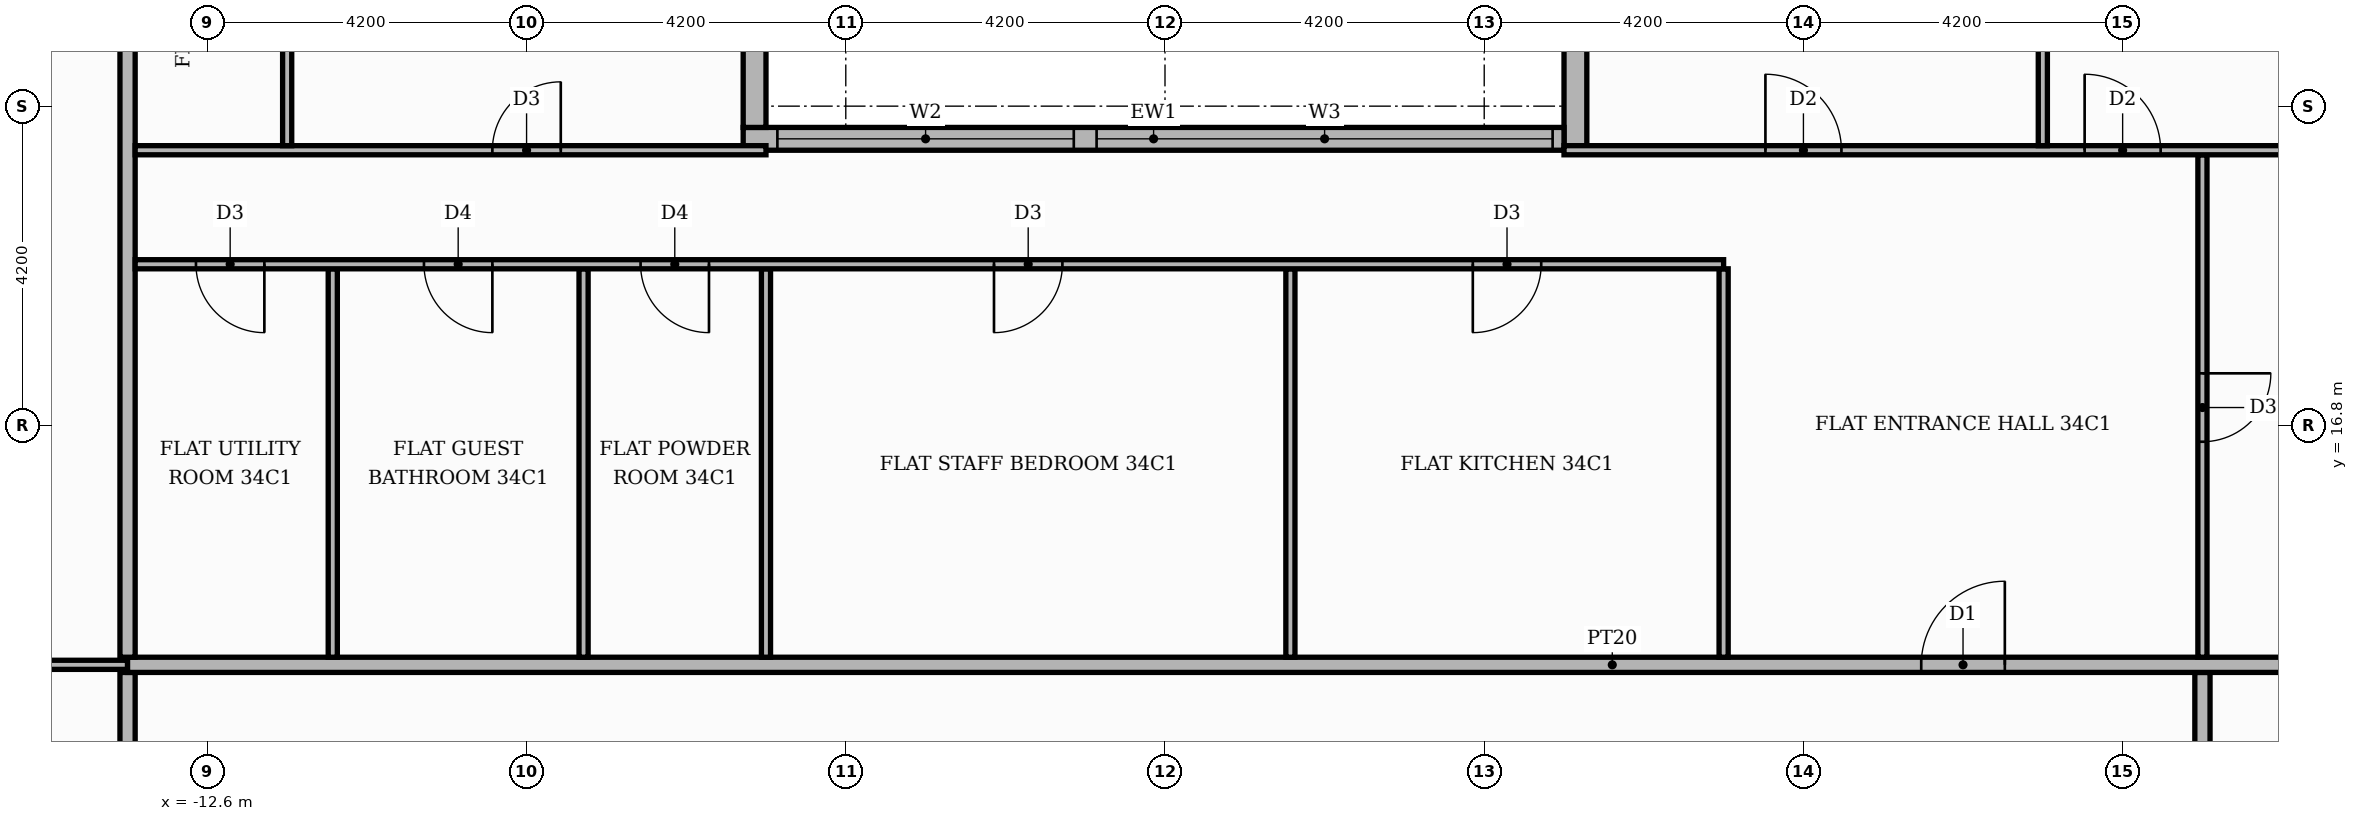
"""IFC4 building model, lengths in metres.
Left out: names, types, materials, properties, quantities, classifications, styles, units other than length and angle.
Written with IfcOpenShell. Run it as: python <this file> out.ifc"""

import sys

from ifc_helpers import new_model, si_unit, direction, frame, frame_2d, origin, place, context, subcontext, project, spatial, rectangle, extrude, element, fill, save


model = new_model("IFC4")
c1 = context("Model", 3, precision=1e-05, world=origin(), true_north=direction((0.0, 1.0)))
c2 = subcontext(c1, "Body", "Model", "MODEL_VIEW")
j1 = project(units=[si_unit("LENGTHUNIT", "METRE"), si_unit("PLANEANGLEUNIT", "RADIAN")], contexts=[c1])
p1 = place(None, origin())
s1 = spatial("IfcSite", under=j1, at=p1, CompositionType="ELEMENT")
p2 = place(p1, origin())
s2 = spatial("IfcBuilding", under=s1, at=p2, CompositionType="ELEMENT")
p3 = place(p2, frame((0.0, 0.0, 145.5)))
s3 = spatial("IfcBuildingStorey", under=s2, at=p3, CompositionType="ELEMENT", Elevation=145.5)
p4 = place(p3, frame((5.4, 25.42, 0.0), z_axis=(0.0, 0.0, 1.0), x_axis=(0.0, -1.0, 0.0)))
e1 = element("IfcWall", 1, at=p4, inside=s3, PredefinedType="STANDARD", context=c2, shape_type="SweptSolid", body=[
    extrude(rectangle(XDim=5.0, YDim=0.3, at=frame_2d((2.5, 0.0))), origin(), (0.0, 0.0, 1.0), 3.48),
])
p5 = place(p4, frame((1.42, 0.0, 0.9)))
e2 = element("IfcOpeningElement", 2, at=p5, cuts=e1, PredefinedType="OPENING", context=c2, shape_type="SweptSolid", body=[
    extrude(rectangle(XDim=1.8, YDim=2.1, at=frame_2d((0.9, 1.05))), frame((0.0, 0.16, 0.0), z_axis=(0.0, -1.0, 0.0), x_axis=(1.0, 0.0, 0.0)), (0.0, 0.0, 1.0), 0.32),
])
p6 = place(p3, frame((5.25, 20.57, 0.0), z_axis=(0.0, 0.0, 1.0), x_axis=(-1.0, 0.0, 0.0)))
e3 = element("IfcWall", 3, at=p6, inside=s3, PredefinedType="STANDARD", context=c2, shape_type="SweptSolid", body=[
    extrude(rectangle(XDim=10.8, YDim=0.3, at=frame_2d((5.4, 0.0))), origin(), (0.0, 0.0, 1.0), 3.48),
])
p7 = place(p6, frame((0.15, 0.0, 0.9)))
e4 = element("IfcOpeningElement", 4, at=p7, cuts=e3, PredefinedType="OPENING", context=c2, shape_type="SweptSolid", body=[
    extrude(rectangle(XDim=6.0, YDim=2.1, at=frame_2d((3.0, 1.05))), frame((0.0, 0.16, 0.0), z_axis=(0.0, -1.0, 0.0), x_axis=(1.0, 0.0, 0.0)), (0.0, 0.0, 1.0), 0.32),
])
p8 = place(p6, frame((6.45, 0.0, 0.9)))
e5 = element("IfcOpeningElement", 5, at=p8, cuts=e3, PredefinedType="OPENING", context=c2, shape_type="SweptSolid", body=[
    extrude(rectangle(XDim=3.9, YDim=2.1, at=frame_2d((1.95, 1.05))), frame((0.0, 0.16, 0.0), z_axis=(0.0, -1.0, 0.0), x_axis=(1.0, 0.0, 0.0)), (0.0, 0.0, 1.0), 0.32),
])
p9 = place(p3, frame((-5.4, 20.72, 0.0), z_axis=(0.0, 0.0, 1.0), x_axis=(0.0, 1.0, 0.0)))
e6 = element("IfcWall", 6, at=p9, inside=s3, PredefinedType="STANDARD", context=c2, shape_type="SweptSolid", body=[
    extrude(rectangle(XDim=5.0, YDim=0.3, at=frame_2d((2.5, 0.0))), origin(), (0.0, 0.0, 1.0), 3.48),
])
p10 = place(p9, frame((1.48, 0.0, 0.9)))
e7 = element("IfcOpeningElement", 7, at=p10, cuts=e6, PredefinedType="OPENING", context=c2, shape_type="SweptSolid", body=[
    extrude(rectangle(XDim=1.8, YDim=2.1, at=frame_2d((0.9, 1.05))), frame((0.0, 0.16, 0.0), z_axis=(0.0, -1.0, 0.0), x_axis=(1.0, 0.0, 0.0)), (0.0, 0.0, 1.0), 0.32),
])
for number, where, z_axis, x_axis in (
    (8, (-13.65, 11.1, 0.0), (0.0, 0.0, 1.0), (0.0, 1.0, 0.0)),
    (9, (13.65, 11.1, 0.0), (0.0, 0.0, 1.0), (0.0, 1.0, 0.0)),
):
    element("IfcWall", number, at=place(p3, frame(where, z_axis=z_axis, x_axis=x_axis)), inside=s3, PredefinedType="PARTITIONING", context=c2, shape_type="SweptSolid", body=[
        extrude(rectangle(XDim=2.45, YDim=0.2, at=frame_2d((1.225, 0.0))), origin(), (0.0, 0.0, 1.0), 3.48),
    ])
p11 = place(p3, frame((-20.12, 13.65, 0.0), z_axis=(0.0, 0.0, 1.0), x_axis=(1.0, 0.0, 0.0)))
e10 = element("IfcWall", 10, at=p11, inside=s3, PredefinedType="PARTITIONING", context=c2, shape_type="SweptSolid", body=[
    extrude(rectangle(XDim=6.47, YDim=0.12, at=frame_2d((3.235, 0.0))), origin(), (0.0, 0.0, 1.0), 3.48),
])
p12 = place(p11, frame((2.785, 0.0, 0.0)))
e11 = element("IfcOpeningElement", 11, at=p12, cuts=e10, PredefinedType="OPENING", context=c2, shape_type="SweptSolid", body=[
    extrude(rectangle(XDim=0.9, YDim=2.1, at=frame_2d((0.45, 1.05))), frame((0.0, 0.07, 0.0), z_axis=(0.0, -1.0, 0.0), x_axis=(1.0, 0.0, 0.0)), (0.0, 0.0, 1.0), 0.14),
])
p13 = place(p3, frame((-13.65, 13.65, 0.0), z_axis=(0.0, 0.0, 1.0), x_axis=(1.0, 0.0, 0.0)))
e12 = element("IfcWall", 12, at=p13, inside=s3, PredefinedType="PARTITIONING", context=c2, shape_type="SweptSolid", body=[
    extrude(rectangle(XDim=39.07, YDim=0.2, at=frame_2d((19.535, 0.0))), origin(), (0.0, 0.0, 1.0), 3.48),
])
p14 = place(p13, frame((23.6, 0.0, 0.0)))
e13 = element("IfcOpeningElement", 13, at=p14, cuts=e12, PredefinedType="OPENING", context=c2, shape_type="SweptSolid", body=[
    extrude(rectangle(XDim=1.1, YDim=2.4, at=frame_2d((0.55, 1.2))), frame((0.0, 0.11, 0.0), z_axis=(0.0, -1.0, 0.0), x_axis=(1.0, 0.0, 0.0)), (0.0, 0.0, 1.0), 0.22),
])
p15 = place(p3, frame((-13.65, 13.75, 0.0), z_axis=(0.0, 0.0, 1.0), x_axis=(0.0, 1.0, 0.0)))
e14 = element("IfcWall", 14, at=p15, inside=s3, PredefinedType="PARTITIONING", context=c2, shape_type="SweptSolid", body=[
    extrude(rectangle(XDim=11.67, YDim=0.2, at=frame_2d((5.835, 0.0))), origin(), (0.0, 0.0, 1.0), 3.48),
])
for number, where, z_axis, x_axis in (
    (15, (-10.95, 13.75, 0.0), (0.0, 0.0, 1.0), (0.0, 1.0, 0.0)),
    (16, (-7.65, 13.75, 0.0), (0.0, 0.0, 1.0), (0.0, 1.0, 0.0)),
    (17, (-5.25, 13.75, 0.0), (0.0, 0.0, 1.0), (0.0, 1.0, 0.0)),
    (18, (1.65, 13.75, 0.0), (0.0, 0.0, 1.0), (0.0, 1.0, 0.0)),
    (19, (7.35, 13.75, 0.0), (0.0, 0.0, 1.0), (0.0, 1.0, 0.0)),
):
    element("IfcWall", number, at=place(p3, frame(where, z_axis=z_axis, x_axis=x_axis)), inside=s3, PredefinedType="PARTITIONING", context=c2, shape_type="SweptSolid", body=[
        extrude(rectangle(XDim=5.11, YDim=0.12, at=frame_2d((2.555, 0.0))), origin(), (0.0, 0.0, 1.0), 3.48),
    ])
p16 = place(p3, frame((13.65, 13.75, 0.0), z_axis=(0.0, 0.0, 1.0), x_axis=(0.0, 1.0, 0.0)))
e20 = element("IfcWall", 20, at=p16, inside=s3, PredefinedType="PARTITIONING", context=c2, shape_type="SweptSolid", body=[
    extrude(rectangle(XDim=6.61, YDim=0.12, at=frame_2d((3.305, 0.0))), origin(), (0.0, 0.0, 1.0), 3.48),
])
p17 = place(p16, frame((2.835, 0.0, 0.0)))
e21 = element("IfcOpeningElement", 21, at=p17, cuts=e20, PredefinedType="OPENING", context=c2, shape_type="SweptSolid", body=[
    extrude(rectangle(XDim=0.9, YDim=2.1, at=frame_2d((0.45, 1.05))), frame((0.0, 0.07, 0.0), z_axis=(0.0, -1.0, 0.0), x_axis=(1.0, 0.0, 0.0)), (0.0, 0.0, 1.0), 0.14),
])
p18 = place(p3, frame((-13.55, 18.92, 0.0), z_axis=(0.0, 0.0, 1.0), x_axis=(1.0, 0.0, 0.0)))
e22 = element("IfcWall", 22, at=p18, inside=s3, PredefinedType="PARTITIONING", context=c2, shape_type="SweptSolid", body=[
    extrude(rectangle(XDim=20.9, YDim=0.12, at=frame_2d((10.45, 0.0))), origin(), (0.0, 0.0, 1.0), 3.48),
])
p19 = place(p18, frame((17.6, 0.0, 0.0)))
e23 = element("IfcOpeningElement", 23, at=p19, cuts=e22, PredefinedType="OPENING", context=c2, shape_type="SweptSolid", body=[
    extrude(rectangle(XDim=0.9, YDim=2.1, at=frame_2d((0.45, 1.05))), frame((0.0, 0.07, 0.0), z_axis=(0.0, -1.0, 0.0), x_axis=(1.0, 0.0, 0.0)), (0.0, 0.0, 1.0), 0.14),
])
p20 = place(p18, frame((11.3, 0.0, 0.0)))
e24 = element("IfcOpeningElement", 24, at=p20, cuts=e22, PredefinedType="OPENING", context=c2, shape_type="SweptSolid", body=[
    extrude(rectangle(XDim=0.9, YDim=2.1, at=frame_2d((0.45, 1.05))), frame((0.0, 0.07, 0.0), z_axis=(0.0, -1.0, 0.0), x_axis=(1.0, 0.0, 0.0)), (0.0, 0.0, 1.0), 0.14),
])
p21 = place(p18, frame((6.65, 0.0, 0.0)))
e25 = element("IfcOpeningElement", 25, at=p21, cuts=e22, PredefinedType="OPENING", context=c2, shape_type="SweptSolid", body=[
    extrude(rectangle(XDim=0.9, YDim=2.1, at=frame_2d((0.45, 1.05))), frame((0.0, 0.07, 0.0), z_axis=(0.0, -1.0, 0.0), x_axis=(1.0, 0.0, 0.0)), (0.0, 0.0, 1.0), 0.14),
])
p22 = place(p18, frame((3.8, 0.0, 0.0)))
e26 = element("IfcOpeningElement", 26, at=p22, cuts=e22, PredefinedType="OPENING", context=c2, shape_type="SweptSolid", body=[
    extrude(rectangle(XDim=0.9, YDim=2.1, at=frame_2d((0.45, 1.05))), frame((0.0, 0.07, 0.0), z_axis=(0.0, -1.0, 0.0), x_axis=(1.0, 0.0, 0.0)), (0.0, 0.0, 1.0), 0.14),
])
p23 = place(p18, frame((0.8, 0.0, 0.0)))
e27 = element("IfcOpeningElement", 27, at=p23, cuts=e22, PredefinedType="OPENING", context=c2, shape_type="SweptSolid", body=[
    extrude(rectangle(XDim=0.9, YDim=2.1, at=frame_2d((0.45, 1.05))), frame((0.0, 0.07, 0.0), z_axis=(0.0, -1.0, 0.0), x_axis=(1.0, 0.0, 0.0)), (0.0, 0.0, 1.0), 0.14),
])
p24 = place(p3, frame((-13.55, 20.42, 0.0), z_axis=(0.0, 0.0, 1.0), x_axis=(1.0, 0.0, 0.0)))
e28 = element("IfcWall", 28, at=p24, inside=s3, PredefinedType="PARTITIONING", context=c2, shape_type="SweptSolid", body=[
    extrude(rectangle(XDim=8.3, YDim=0.12, at=frame_2d((4.15, 0.0))), origin(), (0.0, 0.0, 1.0), 3.48),
])
p25 = place(p24, frame((4.7, 0.0, 0.0)))
e29 = element("IfcOpeningElement", 29, at=p25, cuts=e28, PredefinedType="OPENING", context=c2, shape_type="SweptSolid", body=[
    extrude(rectangle(XDim=0.9, YDim=2.1, at=frame_2d((0.45, 1.05))), frame((0.0, 0.07, 0.0), z_axis=(0.0, -1.0, 0.0), x_axis=(1.0, 0.0, 0.0)), (0.0, 0.0, 1.0), 0.14),
])
p26 = place(p3, frame((5.25, 20.42, 0.0), z_axis=(0.0, 0.0, 1.0), x_axis=(1.0, 0.0, 0.0)))
e30 = element("IfcWall", 30, at=p26, inside=s3, PredefinedType="PARTITIONING", context=c2, shape_type="SweptSolid", body=[
    extrude(rectangle(XDim=20.17, YDim=0.12, at=frame_2d((10.085, 0.0))), origin(), (0.0, 0.0, 1.0), 3.48),
])
p27 = place(p26, frame((6.85, 0.0, 0.0)))
e31 = element("IfcOpeningElement", 31, at=p27, cuts=e30, PredefinedType="OPENING", context=c2, shape_type="SweptSolid", body=[
    extrude(rectangle(XDim=1.0, YDim=2.1, at=frame_2d((0.5, 1.05))), frame((0.0, 0.07, 0.0), z_axis=(0.0, -1.0, 0.0), x_axis=(1.0, 0.0, 0.0)), (0.0, 0.0, 1.0), 0.14),
])
p28 = place(p26, frame((2.65, 0.0, 0.0)))
e32 = element("IfcOpeningElement", 32, at=p28, cuts=e30, PredefinedType="OPENING", context=c2, shape_type="SweptSolid", body=[
    extrude(rectangle(XDim=1.0, YDim=2.1, at=frame_2d((0.5, 1.05))), frame((0.0, 0.07, 0.0), z_axis=(0.0, -1.0, 0.0), x_axis=(1.0, 0.0, 0.0)), (0.0, 0.0, 1.0), 0.14),
])
p29 = place(p3, frame((-11.55, 20.48, 0.0), z_axis=(0.0, 0.0, 1.0), x_axis=(0.0, 1.0, 0.0)))
e33 = element("IfcWall", 33, at=p29, inside=s3, PredefinedType="PARTITIONING", context=c2, shape_type="SweptSolid", body=[
    extrude(rectangle(XDim=4.94, YDim=0.12, at=frame_2d((2.47, 0.0))), origin(), (0.0, 0.0, 1.0), 3.48),
])
p30 = place(p29, frame((2.14, 0.0, 0.0)))
e34 = element("IfcOpeningElement", 34, at=p30, cuts=e33, PredefinedType="OPENING", context=c2, shape_type="SweptSolid", body=[
    extrude(rectangle(XDim=0.9, YDim=2.1, at=frame_2d((0.45, 1.05))), frame((0.0, 0.07, 0.0), z_axis=(0.0, -1.0, 0.0), x_axis=(1.0, 0.0, 0.0)), (0.0, 0.0, 1.0), 0.14),
])
p31 = place(p3, frame((11.55, 20.48, 0.0), z_axis=(0.0, 0.0, 1.0), x_axis=(0.0, 1.0, 0.0)))
e35 = element("IfcWall", 35, at=p31, inside=s3, PredefinedType="PARTITIONING", context=c2, shape_type="SweptSolid", body=[
    extrude(rectangle(XDim=4.94, YDim=0.12, at=frame_2d((2.47, 0.0))), origin(), (0.0, 0.0, 1.0), 3.48),
])
p32 = place(p7, origin())
e36 = element("IfcWindow", 36, at=p32, inside=s3, PartitioningType="SINGLE_PANEL", PredefinedType="WINDOW", context=c2, shape_type="SweptSolid", body=[
    extrude(rectangle(XDim=6.0, YDim=2.1, at=frame_2d((3.0, 1.05))), frame((0.0, 0.03, 0.0), z_axis=(0.0, -1.0, 0.0), x_axis=(1.0, 0.0, 0.0)), (0.0, 0.0, 1.0), 0.06),
])
fill(e4, e36)
p33 = place(p8, origin())
e37 = element("IfcWindow", 37, at=p33, inside=s3, PartitioningType="SINGLE_PANEL", PredefinedType="WINDOW", context=c2, shape_type="SweptSolid", body=[
    extrude(rectangle(XDim=3.9, YDim=2.1, at=frame_2d((1.95, 1.05))), frame((0.0, 0.03, 0.0), z_axis=(0.0, -1.0, 0.0), x_axis=(1.0, 0.0, 0.0)), (0.0, 0.0, 1.0), 0.06),
])
fill(e5, e37)
p34 = place(p14, origin())
e38 = element("IfcDoor", 38, at=p34, inside=s3, OperationType="SINGLE_SWING_RIGHT", PredefinedType="DOOR", context=c2, shape_type="SweptSolid", body=[
    extrude(rectangle(XDim=1.1, YDim=2.4, at=frame_2d((0.55, 1.2))), frame((0.0, 0.025, 0.0), z_axis=(0.0, -1.0, 0.0), x_axis=(1.0, 0.0, 0.0)), (0.0, 0.0, 1.0), 0.05),
])
fill(e13, e38)
p35 = place(p17, frame((0.9, 0.0, 0.0), z_axis=(0.0, 0.0, 1.0), x_axis=(-1.0, 0.0, 0.0)))
e39 = element("IfcDoor", 39, at=p35, inside=s3, OperationType="SINGLE_SWING_RIGHT", PredefinedType="DOOR", context=c2, shape_type="SweptSolid", body=[
    extrude(rectangle(XDim=0.9, YDim=2.1, at=frame_2d((0.45, 1.05))), frame((0.0, 0.025, 0.0), z_axis=(0.0, -1.0, 0.0), x_axis=(1.0, 0.0, 0.0)), (0.0, 0.0, 1.0), 0.05),
])
fill(e21, e39)
p36 = place(p19, frame((0.9, 0.0, 0.0), z_axis=(0.0, 0.0, 1.0), x_axis=(-1.0, 0.0, 0.0)))
e40 = element("IfcDoor", 40, at=p36, inside=s3, OperationType="SINGLE_SWING_LEFT", PredefinedType="DOOR", context=c2, shape_type="SweptSolid", body=[
    extrude(rectangle(XDim=0.9, YDim=2.1, at=frame_2d((0.45, 1.05))), frame((0.0, 0.025, 0.0), z_axis=(0.0, -1.0, 0.0), x_axis=(1.0, 0.0, 0.0)), (0.0, 0.0, 1.0), 0.05),
])
fill(e23, e40)
p37 = place(p20, frame((0.9, 0.0, 0.0), z_axis=(0.0, 0.0, 1.0), x_axis=(-1.0, 0.0, 0.0)))
e41 = element("IfcDoor", 41, at=p37, inside=s3, OperationType="SINGLE_SWING_LEFT", PredefinedType="DOOR", context=c2, shape_type="SweptSolid", body=[
    extrude(rectangle(XDim=0.9, YDim=2.1, at=frame_2d((0.45, 1.05))), frame((0.0, 0.025, 0.0), z_axis=(0.0, -1.0, 0.0), x_axis=(1.0, 0.0, 0.0)), (0.0, 0.0, 1.0), 0.05),
])
fill(e24, e41)
p38 = place(p21, frame((0.9, 0.0, 0.0), z_axis=(0.0, 0.0, 1.0), x_axis=(-1.0, 0.0, 0.0)))
e42 = element("IfcDoor", 42, at=p38, inside=s3, OperationType="SINGLE_SWING_RIGHT", PredefinedType="DOOR", context=c2, shape_type="SweptSolid", body=[
    extrude(rectangle(XDim=0.9, YDim=2.1, at=frame_2d((0.45, 1.05))), frame((0.0, 0.025, 0.0), z_axis=(0.0, -1.0, 0.0), x_axis=(1.0, 0.0, 0.0)), (0.0, 0.0, 1.0), 0.05),
])
fill(e25, e42)
p39 = place(p22, frame((0.9, 0.0, 0.0), z_axis=(0.0, 0.0, 1.0), x_axis=(-1.0, 0.0, 0.0)))
e43 = element("IfcDoor", 43, at=p39, inside=s3, OperationType="SINGLE_SWING_RIGHT", PredefinedType="DOOR", context=c2, shape_type="SweptSolid", body=[
    extrude(rectangle(XDim=0.9, YDim=2.1, at=frame_2d((0.45, 1.05))), frame((0.0, 0.025, 0.0), z_axis=(0.0, -1.0, 0.0), x_axis=(1.0, 0.0, 0.0)), (0.0, 0.0, 1.0), 0.05),
])
fill(e26, e43)
p40 = place(p23, frame((0.9, 0.0, 0.0), z_axis=(0.0, 0.0, 1.0), x_axis=(-1.0, 0.0, 0.0)))
e44 = element("IfcDoor", 44, at=p40, inside=s3, OperationType="SINGLE_SWING_RIGHT", PredefinedType="DOOR", context=c2, shape_type="SweptSolid", body=[
    extrude(rectangle(XDim=0.9, YDim=2.1, at=frame_2d((0.45, 1.05))), frame((0.0, 0.025, 0.0), z_axis=(0.0, -1.0, 0.0), x_axis=(1.0, 0.0, 0.0)), (0.0, 0.0, 1.0), 0.05),
])
fill(e27, e44)
p41 = place(p27, origin())
e45 = element("IfcDoor", 45, at=p41, inside=s3, OperationType="SINGLE_SWING_LEFT", PredefinedType="DOOR", context=c2, shape_type="SweptSolid", body=[
    extrude(rectangle(XDim=1.0, YDim=2.1, at=frame_2d((0.5, 1.05))), frame((0.0, 0.025, 0.0), z_axis=(0.0, -1.0, 0.0), x_axis=(1.0, 0.0, 0.0)), (0.0, 0.0, 1.0), 0.05),
])
fill(e31, e45)
p42 = place(p28, origin())
e46 = element("IfcDoor", 46, at=p42, inside=s3, OperationType="SINGLE_SWING_LEFT", PredefinedType="DOOR", context=c2, shape_type="SweptSolid", body=[
    extrude(rectangle(XDim=1.0, YDim=2.1, at=frame_2d((0.5, 1.05))), frame((0.0, 0.025, 0.0), z_axis=(0.0, -1.0, 0.0), x_axis=(1.0, 0.0, 0.0)), (0.0, 0.0, 1.0), 0.05),
])
fill(e32, e46)
p43 = place(p25, origin())
e47 = element("IfcDoor", 47, at=p43, inside=s3, OperationType="SINGLE_SWING_RIGHT", PredefinedType="DOOR", context=c2, shape_type="SweptSolid", body=[
    extrude(rectangle(XDim=0.9, YDim=2.1, at=frame_2d((0.45, 1.05))), frame((0.0, 0.025, 0.0), z_axis=(0.0, -1.0, 0.0), x_axis=(1.0, 0.0, 0.0)), (0.0, 0.0, 1.0), 0.05),
])
fill(e29, e47)
save(model, sys.argv[1])
